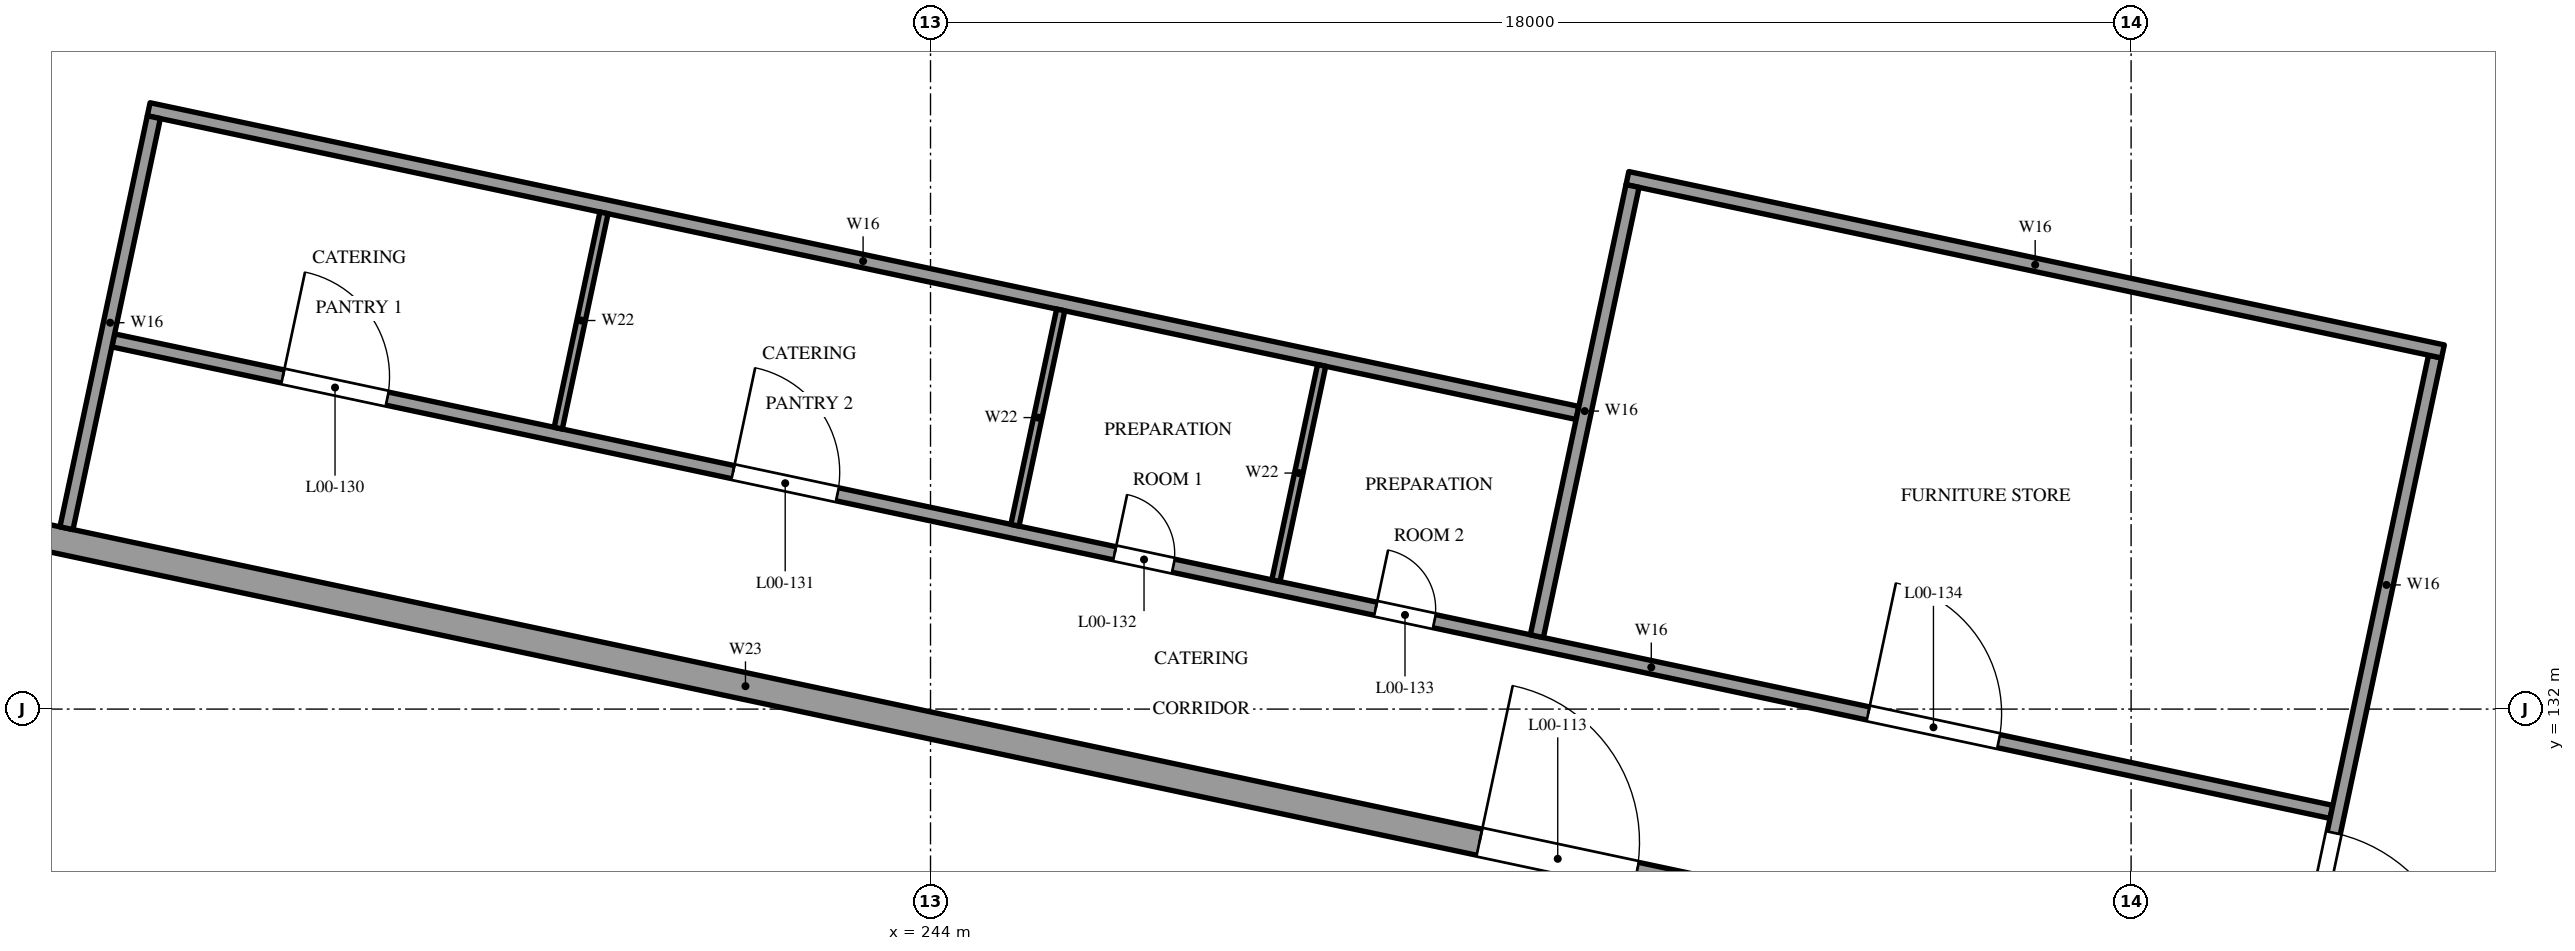
"""IFC4 building model, lengths in metres.
Left out: names, types, materials, properties, quantities, classifications, styles, units other than length and angle.
Written with IfcOpenShell. Run it as: python <this file> out.ifc"""

import sys

from ifc_helpers import new_model, si_unit, direction, frame, frame_2d, origin, place, context, subcontext, project, spatial, polyline, rectangle, outline, extrude, element, fill, save


model = new_model("IFC4")
c1 = context("Model", 3, precision=1e-05, world=origin(), true_north=direction((0.0, 1.0)))
c2 = subcontext(c1, "Body", "Model", "MODEL_VIEW")
j1 = project(units=[si_unit("LENGTHUNIT", "METRE"), si_unit("PLANEANGLEUNIT", "RADIAN")], contexts=[c1])
p1 = place(None, origin())
s1 = spatial("IfcSite", under=j1, at=p1, CompositionType="ELEMENT")
p2 = place(p1, origin())
s2 = spatial("IfcBuilding", under=s1, at=p2, CompositionType="ELEMENT")
p3 = place(p2, origin())
s3 = spatial("IfcBuildingStorey", under=s2, at=p3, CompositionType="ELEMENT", Elevation=0.0)
p4 = place(p3, frame((230.515, 134.62, 0.0), z_axis=(0.0, 0.0, 1.0), x_axis=(0.978147473993, -0.207912287086, 0.0)))
e1 = element("IfcWall", 1, at=p4, inside=s3, PredefinedType="SOLIDWALL", context=c2, shape_type="SweptSolid", body=[
    extrude(rectangle(XDim=34.8, YDim=0.4, at=frame_2d((17.4, 0.0))), origin(), (0.0, 0.0, 1.0), 7.2),
])
p5 = place(p4, frame((22.2, 0.0, 0.0)))
e2 = element("IfcOpeningElement", 2, at=p5, cuts=e1, PredefinedType="OPENING", context=c2, shape_type="SweptSolid", body=[
    extrude(rectangle(XDim=2.4, YDim=2.4, at=frame_2d((1.2, 1.2))), frame((0.0, 0.21, 0.0), z_axis=(0.0, -1.0, 0.0), x_axis=(1.0, 0.0, 0.0)), (0.0, 0.0, 1.0), 0.42),
])
p6 = place(p3, frame((231.746, 137.528, 0.0), z_axis=(0.0, 0.0, 1.0), x_axis=(0.978148575313, -0.20790710573, 0.0)))
e3 = element("IfcWall", 3, at=p6, inside=s3, PredefinedType="SOLIDWALL", context=c2, shape_type="SweptSolid", body=[
    extrude(rectangle(XDim=34.0, YDim=0.2, at=frame_2d((17.0, 0.0))), origin(), (0.0, 0.0, 1.0), 4.558),
])
p7 = place(p6, frame((2.6, 0.0, 0.0)))
e4 = element("IfcOpeningElement", 4, at=p7, cuts=e3, PredefinedType="OPENING", context=c2, shape_type="SweptSolid", body=[
    extrude(rectangle(XDim=1.6, YDim=2.1, at=frame_2d((0.8, 1.05))), frame((0.0, 0.11, 0.0), z_axis=(0.0, -1.0, 0.0), x_axis=(1.0, 0.0, 0.0)), (0.0, 0.0, 1.0), 0.22),
])
p8 = place(p6, frame((9.5, 0.0, 0.0)))
e5 = element("IfcOpeningElement", 5, at=p8, cuts=e3, PredefinedType="OPENING", context=c2, shape_type="SweptSolid", body=[
    extrude(rectangle(XDim=1.6, YDim=2.1, at=frame_2d((0.8, 1.05))), frame((0.0, 0.11, 0.0), z_axis=(0.0, -1.0, 0.0), x_axis=(1.0, 0.0, 0.0)), (0.0, 0.0, 1.0), 0.22),
])
p9 = place(p6, frame((15.35, 0.0, 0.0)))
e6 = element("IfcOpeningElement", 6, at=p9, cuts=e3, PredefinedType="OPENING", context=c2, shape_type="SweptSolid", body=[
    extrude(rectangle(XDim=0.9, YDim=2.1, at=frame_2d((0.45, 1.05))), frame((0.0, 0.11, 0.0), z_axis=(0.0, -1.0, 0.0), x_axis=(1.0, 0.0, 0.0)), (0.0, 0.0, 1.0), 0.22),
])
p10 = place(p6, frame((19.35, 0.0, 0.0)))
e7 = element("IfcOpeningElement", 7, at=p10, cuts=e3, PredefinedType="OPENING", context=c2, shape_type="SweptSolid", body=[
    extrude(rectangle(XDim=0.9, YDim=2.1, at=frame_2d((0.45, 1.05))), frame((0.0, 0.11, 0.0), z_axis=(0.0, -1.0, 0.0), x_axis=(1.0, 0.0, 0.0)), (0.0, 0.0, 1.0), 0.22),
])
p11 = place(p6, frame((26.9, 0.0, 0.0)))
e8 = element("IfcOpeningElement", 8, at=p11, cuts=e3, PredefinedType="OPENING", context=c2, shape_type="SweptSolid", body=[
    extrude(rectangle(XDim=2.0, YDim=2.4, at=frame_2d((1.0, 1.2))), frame((0.0, 0.11, 0.0), z_axis=(0.0, -1.0, 0.0), x_axis=(1.0, 0.0, 0.0)), (0.0, 0.0, 1.0), 0.22),
])
p12 = place(p3, frame((232.279, 140.993, 0.0), z_axis=(0.0, 0.0, 1.0), x_axis=(0.978147913223, -0.207910220665, 0.0)))
e9 = element("IfcWall", 9, at=p12, inside=s3, PredefinedType="SOLIDWALL", context=c2, shape_type="SweptSolid", body=[
    extrude(rectangle(XDim=21.9, YDim=0.2, at=frame_2d((10.95, 0.0))), origin(), (0.0, 0.0, 1.0), 4.362),
])
p13 = place(p3, frame((231.046, 134.712, 0.0), z_axis=(0.0, 0.0, 1.0), x_axis=(0.207906493586, 0.978148705425, 0.0)))
e10 = element("IfcWall", 10, at=p13, inside=s3, PredefinedType="SOLIDWALL", context=c2, shape_type="SweptSolid", body=[
    extrude(outline(polyline([(0.0, 0.0), (6.3, 0.0), (6.3, 4.368), (0.0, 4.72), (0.0, 0.0)])), frame((0.0, 0.1, 0.0), z_axis=(0.0, -1.0, 0.0), x_axis=(1.0, 0.0, 0.0)), (0.0, 0.0, 1.0), 0.2),
])
p14 = place(p3, frame((264.498, 127.602, 0.0), z_axis=(0.0, 0.0, 1.0), x_axis=(0.207915384297, 0.978146815653, 0.0)))
e11 = element("IfcWall", 11, at=p14, inside=s3, PredefinedType="SOLIDWALL", context=c2, shape_type="SweptSolid", body=[
    extrude(outline(polyline([(0.0, 0.0), (9.9, 0.0), (9.9, 4.167), (0.0, 4.72), (0.0, 0.0)])), frame((0.0, 0.1, 0.0), z_axis=(0.0, -1.0, 0.0), x_axis=(1.0, 0.0, 0.0)), (0.0, 0.0, 1.0), 0.2),
])
p15 = place(p14, frame((0.2, 0.0, 0.0)))
e12 = element("IfcOpeningElement", 12, at=p15, cuts=e11, PredefinedType="OPENING", context=c2, shape_type="SweptSolid", body=[
    extrude(rectangle(XDim=2.4, YDim=2.4, at=frame_2d((1.2, 1.2))), frame((0.0, 0.11, 0.0), z_axis=(0.0, -1.0, 0.0), x_axis=(1.0, 0.0, 0.0)), (0.0, 0.0, 1.0), 0.22),
])
p16 = place(p3, frame((254.448, 139.961, 0.0), z_axis=(0.0, 0.0, 1.0), x_axis=(0.978147780131, -0.207910846818, 0.0)))
e13 = element("IfcWall", 13, at=p16, inside=s3, PredefinedType="SOLIDWALL", context=c2, shape_type="SweptSolid", body=[
    extrude(rectangle(XDim=12.5, YDim=0.2, at=frame_2d((6.25, 0.0))), origin(), (0.0, 0.0, 1.0), 4.161),
])
p17 = place(p3, frame((238.419, 136.212, 0.0), z_axis=(0.0, 0.0, 1.0), x_axis=(0.207881760231, 0.978153962198, 0.0)))
e14 = element("IfcWall", 14, at=p17, inside=s3, PredefinedType="PARTITIONING", context=c2, shape_type="SweptSolid", body=[
    extrude(outline(polyline([(0.0, 0.0), (3.3, 0.0), (3.3, 4.368), (0.0, 4.552), (0.0, 0.0)])), frame((0.0, 0.062, 0.0), z_axis=(0.0, -1.0, 0.0), x_axis=(1.0, 0.0, 0.0)), (0.0, 0.0, 1.0), 0.125),
])
p18 = place(p3, frame((245.266, 134.757, 0.0), z_axis=(0.0, 0.0, 1.0), x_axis=(0.207896804268, 0.978150764849, 0.0)))
e15 = element("IfcWall", 15, at=p18, inside=s3, PredefinedType="PARTITIONING", context=c2, shape_type="SweptSolid", body=[
    extrude(outline(polyline([(0.0, 0.0), (3.3, 0.0), (3.3, 4.368), (0.0, 4.552), (0.0, 0.0)])), frame((0.0, 0.062, 0.0), z_axis=(0.0, -1.0, 0.0), x_axis=(1.0, 0.0, 0.0)), (0.0, 0.0, 1.0), 0.125),
])
p19 = place(p3, frame((249.178, 133.925, 0.0), z_axis=(0.0, 0.0, 1.0), x_axis=(0.207881760231, 0.978153962198, 0.0)))
e16 = element("IfcWall", 16, at=p19, inside=s3, PredefinedType="PARTITIONING", context=c2, shape_type="SweptSolid", body=[
    extrude(outline(polyline([(0.0, 0.0), (3.3, 0.0), (3.3, 4.368), (0.0, 4.552), (0.0, 0.0)])), frame((0.0, 0.062, 0.0), z_axis=(0.0, -1.0, 0.0), x_axis=(1.0, 0.0, 0.0)), (0.0, 0.0, 1.0), 0.125),
])
p20 = place(p3, frame((253.091, 133.093, 0.0), z_axis=(0.0, 0.0, 1.0), x_axis=(0.207907420351, 0.97814850844, 0.0)))
e17 = element("IfcWall", 17, at=p20, inside=s3, PredefinedType="SOLIDWALL", context=c2, shape_type="SweptSolid", body=[
    extrude(outline(polyline([(0.0, 0.0), (6.9, 0.0), (6.9, 4.167), (0.0, 4.552), (0.0, 0.0)])), frame((0.0, 0.1, 0.0), z_axis=(0.0, -1.0, 0.0), x_axis=(1.0, 0.0, 0.0)), (0.0, 0.0, 1.0), 0.2),
])
p21 = place(p5, origin())
e18 = element("IfcDoor", 18, at=p21, inside=s3, OperationType="DOUBLE_DOOR_SINGLE_SWING", PredefinedType="DOOR", context=c2, shape_type="SweptSolid", body=[
    extrude(rectangle(XDim=2.4, YDim=2.4, at=frame_2d((1.2, 1.2))), frame((0.0, 0.025, 0.0), z_axis=(0.0, -1.0, 0.0), x_axis=(1.0, 0.0, 0.0)), (0.0, 0.0, 1.0), 0.05),
])
fill(e2, e18)
p22 = place(p15, frame((2.4, 0.0, 0.0), z_axis=(0.0, 0.0, 1.0), x_axis=(-1.0, 0.0, 0.0)))
e19 = element("IfcDoor", 19, at=p22, inside=s3, OperationType="DOUBLE_DOOR_SINGLE_SWING", PredefinedType="DOOR", context=c2, shape_type="SweptSolid", body=[
    extrude(rectangle(XDim=2.4, YDim=2.4, at=frame_2d((1.2, 1.2))), frame((0.0, 0.025, 0.0), z_axis=(0.0, -1.0, 0.0), x_axis=(1.0, 0.0, 0.0)), (0.0, 0.0, 1.0), 0.05),
])
fill(e12, e19)
p23 = place(p7, origin())
e20 = element("IfcDoor", 20, at=p23, inside=s3, OperationType="DOUBLE_DOOR_SINGLE_SWING", PredefinedType="DOOR", context=c2, shape_type="SweptSolid", body=[
    extrude(rectangle(XDim=1.6, YDim=2.1, at=frame_2d((0.8, 1.05))), frame((0.0, 0.025, 0.0), z_axis=(0.0, -1.0, 0.0), x_axis=(1.0, 0.0, 0.0)), (0.0, 0.0, 1.0), 0.05),
])
fill(e4, e20)
p24 = place(p8, origin())
e21 = element("IfcDoor", 21, at=p24, inside=s3, OperationType="DOUBLE_DOOR_SINGLE_SWING", PredefinedType="DOOR", context=c2, shape_type="SweptSolid", body=[
    extrude(rectangle(XDim=1.6, YDim=2.1, at=frame_2d((0.8, 1.05))), frame((0.0, 0.025, 0.0), z_axis=(0.0, -1.0, 0.0), x_axis=(1.0, 0.0, 0.0)), (0.0, 0.0, 1.0), 0.05),
])
fill(e5, e21)
p25 = place(p9, origin())
e22 = element("IfcDoor", 22, at=p25, inside=s3, OperationType="SINGLE_SWING_LEFT", PredefinedType="DOOR", context=c2, shape_type="SweptSolid", body=[
    extrude(rectangle(XDim=0.9, YDim=2.1, at=frame_2d((0.45, 1.05))), frame((0.0, 0.025, 0.0), z_axis=(0.0, -1.0, 0.0), x_axis=(1.0, 0.0, 0.0)), (0.0, 0.0, 1.0), 0.05),
])
fill(e6, e22)
p26 = place(p10, origin())
e23 = element("IfcDoor", 23, at=p26, inside=s3, OperationType="SINGLE_SWING_LEFT", PredefinedType="DOOR", context=c2, shape_type="SweptSolid", body=[
    extrude(rectangle(XDim=0.9, YDim=2.1, at=frame_2d((0.45, 1.05))), frame((0.0, 0.025, 0.0), z_axis=(0.0, -1.0, 0.0), x_axis=(1.0, 0.0, 0.0)), (0.0, 0.0, 1.0), 0.05),
])
fill(e7, e23)
p27 = place(p11, origin())
e24 = element("IfcDoor", 24, at=p27, inside=s3, OperationType="DOUBLE_DOOR_SINGLE_SWING", PredefinedType="DOOR", context=c2, shape_type="SweptSolid", body=[
    extrude(rectangle(XDim=2.0, YDim=2.4, at=frame_2d((1.0, 1.2))), frame((0.0, 0.025, 0.0), z_axis=(0.0, -1.0, 0.0), x_axis=(1.0, 0.0, 0.0)), (0.0, 0.0, 1.0), 0.05),
])
fill(e8, e24)
save(model, sys.argv[1])
